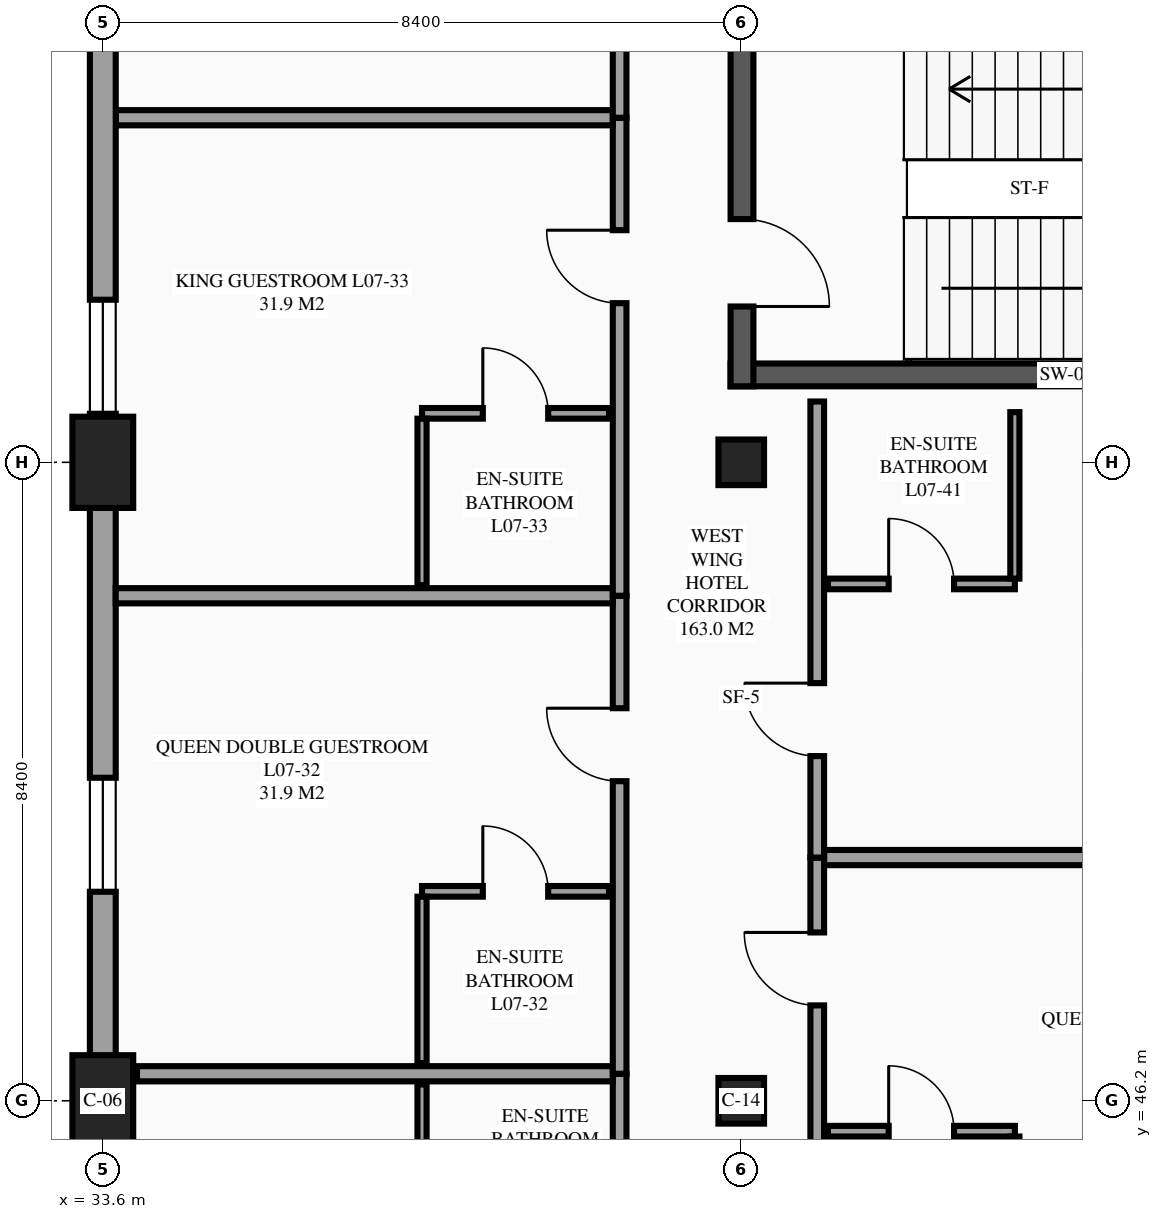
"""IFC4 building model, lengths in metres.
Left out: names, types, materials, properties, quantities, classifications, styles, units other than length and angle.
Written with IfcOpenShell. Run it as: python <this file> out.ifc"""

import sys

from ifc_helpers import new_model, si_unit, direction, frame, frame_2d, origin, origin_2d, place, context, subcontext, project, spatial, rectangle, extrude, element, fill, save


model = new_model("IFC4")
c1 = context("Model", 3, precision=1e-05, world=origin(), true_north=direction((0.0, 1.0)))
c2 = subcontext(c1, "Body", "Model", "MODEL_VIEW")
j1 = project(units=[si_unit("LENGTHUNIT", "METRE"), si_unit("PLANEANGLEUNIT", "RADIAN")], contexts=[c1])
p1 = place(None, origin())
s1 = spatial("IfcSite", under=j1, at=p1, CompositionType="ELEMENT")
p2 = place(p1, origin())
s2 = spatial("IfcBuilding", under=s1, at=p2, CompositionType="ELEMENT")
p3 = place(p2, frame((0.0, 0.0, 29.1)))
s3 = spatial("IfcBuildingStorey", under=s2, at=p3, CompositionType="ELEMENT", Elevation=29.1)
for number, where, z_axis, x_axis in (
    (1, (33.6, 46.2, 0.0), (0.0, 0.0, 1.0), (1.0, 0.0, 0.0)),
    (2, (33.6, 54.6, 0.0), (0.0, 0.0, 1.0), (1.0, 0.0, 0.0)),
):
    element("IfcColumn", number, at=place(p3, frame(where, z_axis=z_axis, x_axis=x_axis)), inside=s3, PredefinedType="COLUMN", context=c2, shape_type="SweptSolid", body=[
        extrude(rectangle(XDim=0.8, YDim=1.2, at=origin_2d()), origin(), (0.0, 0.0, 1.0), 3.6),
    ])
for number, where, z_axis, x_axis in (
    (3, (42.0, 46.2, 0.0), (0.0, 0.0, 1.0), (1.0, 0.0, 0.0)),
    (4, (42.0, 54.6, 0.0), (0.0, 0.0, 1.0), (1.0, 0.0, 0.0)),
):
    element("IfcColumn", number, at=place(p3, frame(where, z_axis=z_axis, x_axis=x_axis)), inside=s3, PredefinedType="COLUMN", context=c2, shape_type="SweptSolid", body=[
        extrude(rectangle(XDim=0.6, YDim=0.6, at=origin_2d()), origin(), (0.0, 0.0, 1.0), 3.6),
    ])
p4 = place(p3, frame((33.6, 54.6, 0.0), z_axis=(0.0, 0.0, 1.0), x_axis=(0.0, -1.0, 0.0)))
e5 = element("IfcWall", 5, at=p4, inside=s3, PredefinedType="STANDARD", context=c2, shape_type="SweptSolid", body=[
    extrude(rectangle(XDim=25.2, YDim=0.34, at=frame_2d((12.6, 0.0))), origin(), (0.0, 0.0, 1.0), 2.48),
])
p5 = place(p4, frame((23.017, 0.0, 0.85)))
e6 = element("IfcOpeningElement", 6, at=p5, cuts=e5, PredefinedType="OPENING", context=c2, shape_type="SweptSolid", body=[
    extrude(rectangle(XDim=1.5, YDim=1.5, at=frame_2d((0.75, 0.75))), frame((0.0, 0.18, 0.0), z_axis=(0.0, -1.0, 0.0), x_axis=(1.0, 0.0, 0.0)), (0.0, 0.0, 1.0), 0.36),
])
p6 = place(p4, frame((17.478, 0.0, 0.85)))
e7 = element("IfcOpeningElement", 7, at=p6, cuts=e5, PredefinedType="OPENING", context=c2, shape_type="SweptSolid", body=[
    extrude(rectangle(XDim=1.5, YDim=1.5, at=frame_2d((0.75, 0.75))), frame((0.0, 0.18, 0.0), z_axis=(0.0, -1.0, 0.0), x_axis=(1.0, 0.0, 0.0)), (0.0, 0.0, 1.0), 0.36),
])
p7 = place(p4, frame((10.439, 0.0, 0.85)))
e8 = element("IfcOpeningElement", 8, at=p7, cuts=e5, PredefinedType="OPENING", context=c2, shape_type="SweptSolid", body=[
    extrude(rectangle(XDim=1.5, YDim=1.5, at=frame_2d((0.75, 0.75))), frame((0.0, 0.18, 0.0), z_axis=(0.0, -1.0, 0.0), x_axis=(1.0, 0.0, 0.0)), (0.0, 0.0, 1.0), 0.36),
])
p8 = place(p4, frame((4.15, 0.0, 0.85)))
e9 = element("IfcOpeningElement", 9, at=p8, cuts=e5, PredefinedType="OPENING", context=c2, shape_type="SweptSolid", body=[
    extrude(rectangle(XDim=1.5, YDim=1.5, at=frame_2d((0.75, 0.75))), frame((0.0, 0.18, 0.0), z_axis=(0.0, -1.0, 0.0), x_axis=(1.0, 0.0, 0.0)), (0.0, 0.0, 1.0), 0.36),
])
p9 = place(p3, frame((41.86, 55.75, 0.0), z_axis=(0.0, 0.0, 1.0), x_axis=(1.0, 0.0, 0.0)))
e10 = element("IfcWall", 10, at=p9, inside=s3, PredefinedType="SHEAR", context=c2, shape_type="SweptSolid", body=[
    extrude(rectangle(XDim=8.84, YDim=0.3, at=frame_2d((4.42, 0.0))), origin(), (0.0, 0.0, 1.0), 3.6),
])
p10 = place(p3, frame((42.01, 60.8, 0.0), z_axis=(0.0, 0.0, 1.0), x_axis=(0.0, -1.0, 0.0)))
e11 = element("IfcWall", 11, at=p10, inside=s3, PredefinedType="SHEAR", context=c2, shape_type="SweptSolid", body=[
    extrude(rectangle(XDim=5.2, YDim=0.3, at=frame_2d((2.6, 0.0))), origin(), (0.0, 0.0, 1.0), 3.6),
])
p11 = place(p10, frame((3.0, 0.0, 0.0)))
e12 = element("IfcOpeningElement", 12, at=p11, cuts=e11, PredefinedType="OPENING", context=c2, shape_type="SweptSolid", body=[
    extrude(rectangle(XDim=1.15, YDim=2.15, at=frame_2d((0.575, 1.075))), frame((0.0, 0.16, 0.0), z_axis=(0.0, -1.0, 0.0), x_axis=(1.0, 0.0, 0.0)), (0.0, 0.0, 1.0), 0.32),
])
p12 = place(p3, frame((40.4, 40.267, 0.0), z_axis=(0.0, 0.0, 1.0), x_axis=(0.0, 1.0, 0.0)))
e13 = element("IfcWall", 13, at=p12, inside=s3, PredefinedType="PARTITIONING", context=c2, shape_type="SweptSolid", body=[
    extrude(rectangle(XDim=6.289, YDim=0.18, at=frame_2d((3.145, 0.0))), origin(), (0.0, 0.0, 1.0), 3.375),
])
p13 = place(p12, frame((1.479, 0.0, 0.0)))
e14 = element("IfcOpeningElement", 14, at=p13, cuts=e13, PredefinedType="OPENING", context=c2, shape_type="SweptSolid", body=[
    extrude(rectangle(XDim=0.96, YDim=2.15, at=frame_2d((0.48, 1.075))), frame((0.0, 0.1, 0.0), z_axis=(0.0, -1.0, 0.0), x_axis=(1.0, 0.0, 0.0)), (0.0, 0.0, 1.0), 0.2),
])
p14 = place(p3, frame((34.05, 46.556, 0.0), z_axis=(0.0, 0.0, 1.0), x_axis=(1.0, 0.0, 0.0)))
e15 = element("IfcWall", 15, at=p14, inside=s3, PredefinedType="PARTITIONING", context=c2, shape_type="SweptSolid", body=[
    extrude(rectangle(XDim=6.26, YDim=0.2, at=frame_2d((3.13, 0.0))), origin(), (0.0, 0.0, 1.0), 3.375),
])
p15 = place(p3, frame((37.8, 44.226, 0.0), z_axis=(0.0, 0.0, 1.0), x_axis=(0.0, 1.0, 0.0)))
e16 = element("IfcWall", 16, at=p15, inside=s3, PredefinedType="PARTITIONING", context=c2, shape_type="SweptSolid", body=[
    extrude(rectangle(XDim=2.19, YDim=0.12, at=frame_2d((1.095, 0.0))), origin(), (0.0, 0.0, 1.0), 3.375),
])
p16 = place(p3, frame((40.4, 46.556, 0.0), z_axis=(0.0, 0.0, 1.0), x_axis=(0.0, 1.0, 0.0)))
e17 = element("IfcWall", 17, at=p16, inside=s3, PredefinedType="PARTITIONING", context=c2, shape_type="SweptSolid", body=[
    extrude(rectangle(XDim=6.289, YDim=0.18, at=frame_2d((3.145, 0.0))), origin(), (0.0, 0.0, 1.0), 3.375),
])
p17 = place(p16, frame((3.849, 0.0, 0.0)))
e18 = element("IfcOpeningElement", 18, at=p17, cuts=e17, PredefinedType="OPENING", context=c2, shape_type="SweptSolid", body=[
    extrude(rectangle(XDim=0.96, YDim=2.15, at=frame_2d((0.48, 1.075))), frame((0.0, 0.1, 0.0), z_axis=(0.0, -1.0, 0.0), x_axis=(1.0, 0.0, 0.0)), (0.0, 0.0, 1.0), 0.2),
])
p18 = place(p3, frame((33.77, 52.844, 0.0), z_axis=(0.0, 0.0, 1.0), x_axis=(1.0, 0.0, 0.0)))
e19 = element("IfcWall", 19, at=p18, inside=s3, PredefinedType="PARTITIONING", context=c2, shape_type="SweptSolid", body=[
    extrude(rectangle(XDim=6.54, YDim=0.2, at=frame_2d((3.27, 0.0))), origin(), (0.0, 0.0, 1.0), 3.375),
])
p19 = place(p3, frame((37.8, 48.956, 0.0), z_axis=(0.0, 0.0, 1.0), x_axis=(1.0, 0.0, 0.0)))
e20 = element("IfcWall", 20, at=p19, inside=s3, PredefinedType="PARTITIONING", context=c2, shape_type="SweptSolid", body=[
    extrude(rectangle(XDim=2.46, YDim=0.14, at=frame_2d((1.23, 0.0))), origin(), (0.0, 0.0, 1.0), 3.375),
])
p20 = place(p19, frame((0.8, 0.0, 0.0)))
e21 = element("IfcOpeningElement", 21, at=p20, cuts=e20, PredefinedType="OPENING", context=c2, shape_type="SweptSolid", body=[
    extrude(rectangle(XDim=0.86, YDim=2.1, at=frame_2d((0.43, 1.05))), frame((0.0, 0.08, 0.0), z_axis=(0.0, -1.0, 0.0), x_axis=(1.0, 0.0, 0.0)), (0.0, 0.0, 1.0), 0.16),
])
p21 = place(p3, frame((37.8, 46.696, 0.0), z_axis=(0.0, 0.0, 1.0), x_axis=(0.0, 1.0, 0.0)))
e22 = element("IfcWall", 22, at=p21, inside=s3, PredefinedType="PARTITIONING", context=c2, shape_type="SweptSolid", body=[
    extrude(rectangle(XDim=2.19, YDim=0.12, at=frame_2d((1.095, 0.0))), origin(), (0.0, 0.0, 1.0), 3.375),
])
p22 = place(p3, frame((40.4, 52.844, 0.0), z_axis=(0.0, 0.0, 1.0), x_axis=(0.0, 1.0, 0.0)))
e23 = element("IfcWall", 23, at=p22, inside=s3, PredefinedType="PARTITIONING", context=c2, shape_type="SweptSolid", body=[
    extrude(rectangle(XDim=6.289, YDim=0.18, at=frame_2d((3.145, 0.0))), origin(), (0.0, 0.0, 1.0), 3.375),
])
p23 = place(p22, frame((3.85, 0.0, 0.0)))
e24 = element("IfcOpeningElement", 24, at=p23, cuts=e23, PredefinedType="OPENING", context=c2, shape_type="SweptSolid", body=[
    extrude(rectangle(XDim=0.96, YDim=2.15, at=frame_2d((0.48, 1.075))), frame((0.0, 0.1, 0.0), z_axis=(0.0, -1.0, 0.0), x_axis=(1.0, 0.0, 0.0)), (0.0, 0.0, 1.0), 0.2),
])
p24 = place(p3, frame((33.77, 59.133, 0.0), z_axis=(0.0, 0.0, 1.0), x_axis=(1.0, 0.0, 0.0)))
e25 = element("IfcWall", 25, at=p24, inside=s3, PredefinedType="PARTITIONING", context=c2, shape_type="SweptSolid", body=[
    extrude(rectangle(XDim=6.54, YDim=0.2, at=frame_2d((3.27, 0.0))), origin(), (0.0, 0.0, 1.0), 3.375),
])
p25 = place(p3, frame((37.8, 55.244, 0.0), z_axis=(0.0, 0.0, 1.0), x_axis=(1.0, 0.0, 0.0)))
e26 = element("IfcWall", 26, at=p25, inside=s3, PredefinedType="PARTITIONING", context=c2, shape_type="SweptSolid", body=[
    extrude(rectangle(XDim=2.46, YDim=0.14, at=frame_2d((1.23, 0.0))), origin(), (0.0, 0.0, 1.0), 3.375),
])
p26 = place(p25, frame((0.8, 0.0, 0.0)))
e27 = element("IfcOpeningElement", 27, at=p26, cuts=e26, PredefinedType="OPENING", context=c2, shape_type="SweptSolid", body=[
    extrude(rectangle(XDim=0.86, YDim=2.1, at=frame_2d((0.43, 1.05))), frame((0.0, 0.08, 0.0), z_axis=(0.0, -1.0, 0.0), x_axis=(1.0, 0.0, 0.0)), (0.0, 0.0, 1.0), 0.16),
])
p27 = place(p3, frame((37.8, 52.984, 0.0), z_axis=(0.0, 0.0, 1.0), x_axis=(0.0, 1.0, 0.0)))
e28 = element("IfcWall", 28, at=p27, inside=s3, PredefinedType="PARTITIONING", context=c2, shape_type="SweptSolid", body=[
    extrude(rectangle(XDim=2.19, YDim=0.12, at=frame_2d((1.095, 0.0))), origin(), (0.0, 0.0, 1.0), 3.375),
])
p28 = place(p3, frame((40.4, 59.133, 0.0), z_axis=(0.0, 0.0, 1.0), x_axis=(0.0, 1.0, 0.0)))
e29 = element("IfcWall", 29, at=p28, inside=s3, PredefinedType="PARTITIONING", context=c2, shape_type="SweptSolid", body=[
    extrude(rectangle(XDim=6.289, YDim=0.18, at=frame_2d((3.145, 0.0))), origin(), (0.0, 0.0, 1.0), 3.375),
])
p29 = place(p28, frame((1.479, 0.0, 0.0)))
e30 = element("IfcOpeningElement", 30, at=p29, cuts=e29, PredefinedType="OPENING", context=c2, shape_type="SweptSolid", body=[
    extrude(rectangle(XDim=0.96, YDim=2.15, at=frame_2d((0.48, 1.075))), frame((0.0, 0.1, 0.0), z_axis=(0.0, -1.0, 0.0), x_axis=(1.0, 0.0, 0.0)), (0.0, 0.0, 1.0), 0.2),
])
p30 = place(p3, frame((43.0, 43.4, 0.0), z_axis=(0.0, 0.0, 1.0), x_axis=(0.0, 1.0, 0.0)))
e31 = element("IfcWall", 31, at=p30, inside=s3, PredefinedType="PARTITIONING", context=c2, shape_type="SweptSolid", body=[
    extrude(rectangle(XDim=6.0, YDim=0.18, at=frame_2d((3.0, 0.0))), origin(), (0.0, 0.0, 1.0), 3.375),
])
p31 = place(p30, frame((4.055, 0.0, 0.0)))
e32 = element("IfcOpeningElement", 32, at=p31, cuts=e31, PredefinedType="OPENING", context=c2, shape_type="SweptSolid", body=[
    extrude(rectangle(XDim=0.96, YDim=2.15, at=frame_2d((0.48, 1.075))), frame((0.0, 0.1, 0.0), z_axis=(0.0, -1.0, 0.0), x_axis=(1.0, 0.0, 0.0)), (0.0, 0.0, 1.0), 0.2),
])
p32 = place(p3, frame((43.09, 49.4, 0.0), z_axis=(0.0, 0.0, 1.0), x_axis=(1.0, 0.0, 0.0)))
e33 = element("IfcWall", 33, at=p32, inside=s3, PredefinedType="PARTITIONING", context=c2, shape_type="SweptSolid", body=[
    extrude(rectangle(XDim=7.14, YDim=0.2, at=frame_2d((3.57, 0.0))), origin(), (0.0, 0.0, 1.0), 3.375),
])
p33 = place(p3, frame((43.14, 45.8, 0.0), z_axis=(0.0, 0.0, 1.0), x_axis=(1.0, 0.0, 0.0)))
e34 = element("IfcWall", 34, at=p33, inside=s3, PredefinedType="PARTITIONING", context=c2, shape_type="SweptSolid", body=[
    extrude(rectangle(XDim=2.46, YDim=0.14, at=frame_2d((1.23, 0.0))), origin(), (0.0, 0.0, 1.0), 3.375),
])
p34 = place(p33, frame((0.8, 0.0, 0.0)))
e35 = element("IfcOpeningElement", 35, at=p34, cuts=e34, PredefinedType="OPENING", context=c2, shape_type="SweptSolid", body=[
    extrude(rectangle(XDim=0.86, YDim=2.1, at=frame_2d((0.43, 1.05))), frame((0.0, 0.08, 0.0), z_axis=(0.0, -1.0, 0.0), x_axis=(1.0, 0.0, 0.0)), (0.0, 0.0, 1.0), 0.16),
])
p35 = place(p3, frame((45.6, 43.54, 0.0), z_axis=(0.0, 0.0, 1.0), x_axis=(0.0, 1.0, 0.0)))
e36 = element("IfcWall", 36, at=p35, inside=s3, PredefinedType="PARTITIONING", context=c2, shape_type="SweptSolid", body=[
    extrude(rectangle(XDim=2.19, YDim=0.12, at=frame_2d((1.095, 0.0))), origin(), (0.0, 0.0, 1.0), 3.375),
])
p36 = place(p3, frame((43.0, 49.4, 0.0), z_axis=(0.0, 0.0, 1.0), x_axis=(0.0, 1.0, 0.0)))
e37 = element("IfcWall", 37, at=p36, inside=s3, PredefinedType="PARTITIONING", context=c2, shape_type="SweptSolid", body=[
    extrude(rectangle(XDim=6.0, YDim=0.18, at=frame_2d((3.0, 0.0))), origin(), (0.0, 0.0, 1.0), 3.375),
])
p37 = place(p36, frame((1.335, 0.0, 0.0)))
e38 = element("IfcOpeningElement", 38, at=p37, cuts=e37, PredefinedType="OPENING", context=c2, shape_type="SweptSolid", body=[
    extrude(rectangle(XDim=0.96, YDim=2.15, at=frame_2d((0.48, 1.075))), frame((0.0, 0.1, 0.0), z_axis=(0.0, -1.0, 0.0), x_axis=(1.0, 0.0, 0.0)), (0.0, 0.0, 1.0), 0.2),
])
p38 = place(p3, frame((43.14, 53.0, 0.0), z_axis=(0.0, 0.0, 1.0), x_axis=(1.0, 0.0, 0.0)))
e39 = element("IfcWall", 39, at=p38, inside=s3, PredefinedType="PARTITIONING", context=c2, shape_type="SweptSolid", body=[
    extrude(rectangle(XDim=2.46, YDim=0.14, at=frame_2d((1.23, 0.0))), origin(), (0.0, 0.0, 1.0), 3.375),
])
p39 = place(p38, frame((0.8, 0.0, 0.0)))
e40 = element("IfcOpeningElement", 40, at=p39, cuts=e39, PredefinedType="OPENING", context=c2, shape_type="SweptSolid", body=[
    extrude(rectangle(XDim=0.86, YDim=2.1, at=frame_2d((0.43, 1.05))), frame((0.0, 0.08, 0.0), z_axis=(0.0, -1.0, 0.0), x_axis=(1.0, 0.0, 0.0)), (0.0, 0.0, 1.0), 0.16),
])
p40 = place(p3, frame((45.6, 53.07, 0.0), z_axis=(0.0, 0.0, 1.0), x_axis=(0.0, 1.0, 0.0)))
e41 = element("IfcWall", 41, at=p40, inside=s3, PredefinedType="PARTITIONING", context=c2, shape_type="SweptSolid", body=[
    extrude(rectangle(XDim=2.19, YDim=0.12, at=frame_2d((1.095, 0.0))), origin(), (0.0, 0.0, 1.0), 3.375),
])
p41 = place(p3, frame((33.6, 63.0, 0.0), z_axis=(0.0, 0.0, 1.0), x_axis=(0.0, -1.0, 0.0)))
e42 = element("IfcWall", 42, at=p41, inside=s3, PredefinedType="STANDARD", context=c2, shape_type="SweptSolid", body=[
    extrude(rectangle(XDim=8.4, YDim=0.34, at=frame_2d((4.2, 0.0))), origin(), (0.0, 0.0, 1.0), 3.126),
])
p42 = place(p41, frame((6.261, 0.0, 0.85)))
e43 = element("IfcOpeningElement", 43, at=p42, cuts=e42, PredefinedType="OPENING", context=c2, shape_type="SweptSolid", body=[
    extrude(rectangle(XDim=1.5, YDim=1.5, at=frame_2d((0.75, 0.75))), frame((0.0, 0.18, 0.0), z_axis=(0.0, -1.0, 0.0), x_axis=(1.0, 0.0, 0.0)), (0.0, 0.0, 1.0), 0.36),
])
p43 = place(p41, frame((0.722, 0.0, 0.85)))
e44 = element("IfcOpeningElement", 44, at=p43, cuts=e42, PredefinedType="OPENING", context=c2, shape_type="SweptSolid", body=[
    extrude(rectangle(XDim=1.5, YDim=1.5, at=frame_2d((0.75, 0.75))), frame((0.0, 0.18, 0.0), z_axis=(0.0, -1.0, 0.0), x_axis=(1.0, 0.0, 0.0)), (0.0, 0.0, 1.0), 0.36),
])
p44 = place(p8, origin())
e45 = element("IfcWindow", 45, at=p44, inside=s3, PartitioningType="SINGLE_PANEL", PredefinedType="WINDOW", context=c2, shape_type="SweptSolid", body=[
    extrude(rectangle(XDim=1.5, YDim=1.5, at=frame_2d((0.75, 0.75))), frame((0.0, 0.03, 0.0), z_axis=(0.0, -1.0, 0.0), x_axis=(1.0, 0.0, 0.0)), (0.0, 0.0, 1.0), 0.06),
])
fill(e9, e45)
p45 = place(p42, origin())
e46 = element("IfcWindow", 46, at=p45, inside=s3, PartitioningType="SINGLE_PANEL", PredefinedType="WINDOW", context=c2, shape_type="SweptSolid", body=[
    extrude(rectangle(XDim=1.5, YDim=1.5, at=frame_2d((0.75, 0.75))), frame((0.0, 0.03, 0.0), z_axis=(0.0, -1.0, 0.0), x_axis=(1.0, 0.0, 0.0)), (0.0, 0.0, 1.0), 0.06),
])
fill(e43, e46)
p46 = place(p11, origin())
e47 = element("IfcDoor", 47, at=p46, inside=s3, OperationType="SINGLE_SWING_RIGHT", PredefinedType="DOOR", context=c2, shape_type="SweptSolid", body=[
    extrude(rectangle(XDim=1.15, YDim=2.15, at=frame_2d((0.575, 1.075))), frame((0.0, 0.025, 0.0), z_axis=(0.0, -1.0, 0.0), x_axis=(1.0, 0.0, 0.0)), (0.0, 0.0, 1.0), 0.05),
])
fill(e12, e47)
p47 = place(p17, origin())
e48 = element("IfcDoor", 48, at=p47, inside=s3, OperationType="SINGLE_SWING_RIGHT", PredefinedType="DOOR", context=c2, shape_type="SweptSolid", body=[
    extrude(rectangle(XDim=0.96, YDim=2.15, at=frame_2d((0.48, 1.075))), frame((0.0, 0.025, 0.0), z_axis=(0.0, -1.0, 0.0), x_axis=(1.0, 0.0, 0.0)), (0.0, 0.0, 1.0), 0.05),
])
fill(e18, e48)
p48 = place(p20, origin())
e49 = element("IfcDoor", 49, at=p48, inside=s3, OperationType="SINGLE_SWING_LEFT", PredefinedType="DOOR", context=c2, shape_type="SweptSolid", body=[
    extrude(rectangle(XDim=0.86, YDim=2.1, at=frame_2d((0.43, 1.05))), frame((0.0, 0.025, 0.0), z_axis=(0.0, -1.0, 0.0), x_axis=(1.0, 0.0, 0.0)), (0.0, 0.0, 1.0), 0.05),
])
fill(e21, e49)
p49 = place(p23, origin())
e50 = element("IfcDoor", 50, at=p49, inside=s3, OperationType="SINGLE_SWING_RIGHT", PredefinedType="DOOR", context=c2, shape_type="SweptSolid", body=[
    extrude(rectangle(XDim=0.96, YDim=2.15, at=frame_2d((0.48, 1.075))), frame((0.0, 0.025, 0.0), z_axis=(0.0, -1.0, 0.0), x_axis=(1.0, 0.0, 0.0)), (0.0, 0.0, 1.0), 0.05),
])
fill(e24, e50)
p50 = place(p26, origin())
e51 = element("IfcDoor", 51, at=p50, inside=s3, OperationType="SINGLE_SWING_LEFT", PredefinedType="DOOR", context=c2, shape_type="SweptSolid", body=[
    extrude(rectangle(XDim=0.86, YDim=2.1, at=frame_2d((0.43, 1.05))), frame((0.0, 0.025, 0.0), z_axis=(0.0, -1.0, 0.0), x_axis=(1.0, 0.0, 0.0)), (0.0, 0.0, 1.0), 0.05),
])
fill(e27, e51)
p51 = place(p31, origin())
e52 = element("IfcDoor", 52, at=p51, inside=s3, OperationType="SINGLE_SWING_RIGHT", PredefinedType="DOOR", context=c2, shape_type="SweptSolid", body=[
    extrude(rectangle(XDim=0.96, YDim=2.15, at=frame_2d((0.48, 1.075))), frame((0.0, 0.025, 0.0), z_axis=(0.0, -1.0, 0.0), x_axis=(1.0, 0.0, 0.0)), (0.0, 0.0, 1.0), 0.05),
])
fill(e32, e52)
p52 = place(p34, origin())
e53 = element("IfcDoor", 53, at=p52, inside=s3, OperationType="SINGLE_SWING_LEFT", PredefinedType="DOOR", context=c2, shape_type="SweptSolid", body=[
    extrude(rectangle(XDim=0.86, YDim=2.1, at=frame_2d((0.43, 1.05))), frame((0.0, 0.025, 0.0), z_axis=(0.0, -1.0, 0.0), x_axis=(1.0, 0.0, 0.0)), (0.0, 0.0, 1.0), 0.05),
])
fill(e35, e53)
p53 = place(p37, origin())
e54 = element("IfcDoor", 54, at=p53, inside=s3, OperationType="SINGLE_SWING_RIGHT", PredefinedType="DOOR", context=c2, shape_type="SweptSolid", body=[
    extrude(rectangle(XDim=0.96, YDim=2.15, at=frame_2d((0.48, 1.075))), frame((0.0, 0.025, 0.0), z_axis=(0.0, -1.0, 0.0), x_axis=(1.0, 0.0, 0.0)), (0.0, 0.0, 1.0), 0.05),
])
fill(e38, e54)
p54 = place(p39, origin())
e55 = element("IfcDoor", 55, at=p54, inside=s3, OperationType="SINGLE_SWING_LEFT", PredefinedType="DOOR", context=c2, shape_type="SweptSolid", body=[
    extrude(rectangle(XDim=0.86, YDim=2.1, at=frame_2d((0.43, 1.05))), frame((0.0, 0.025, 0.0), z_axis=(0.0, -1.0, 0.0), x_axis=(1.0, 0.0, 0.0)), (0.0, 0.0, 1.0), 0.05),
])
fill(e40, e55)
save(model, sys.argv[1])
